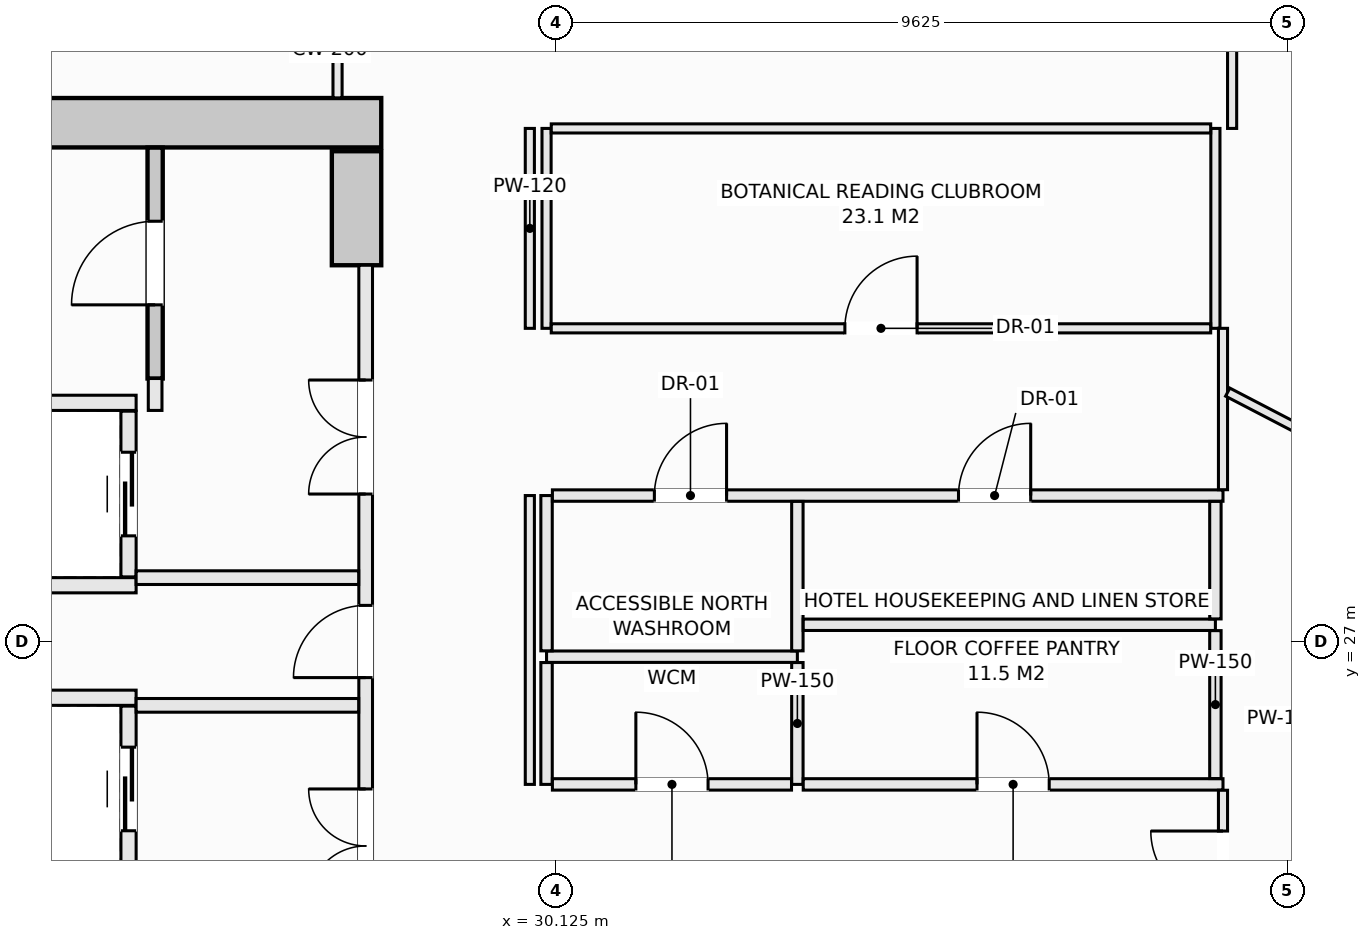
"""IFC4 building model, lengths in metres.
Left out: names, types, materials, properties, quantities, classifications, styles, units other than length and angle.
Written with IfcOpenShell. Run it as: python <this file> out.ifc"""

import sys

from ifc_helpers import new_model, si_unit, direction, frame, frame_2d, origin, place, context, subcontext, project, spatial, rectangle, extrude, element, fill, save


model = new_model("IFC4")
c1 = context("Model", 3, precision=1e-05, world=origin(), true_north=direction((0.0, 1.0)))
c2 = subcontext(c1, "Body", "Model", "MODEL_VIEW")
j1 = project(units=[si_unit("LENGTHUNIT", "METRE"), si_unit("PLANEANGLEUNIT", "RADIAN")], contexts=[c1])
p1 = place(None, origin())
s1 = spatial("IfcSite", under=j1, at=p1, CompositionType="ELEMENT")
p2 = place(p1, origin())
s2 = spatial("IfcBuilding", under=s1, at=p2, CompositionType="ELEMENT")
p3 = place(p2, frame((0.0, 0.0, 173.3)))
s3 = spatial("IfcBuildingStorey", under=s2, at=p3, CompositionType="ELEMENT", Elevation=173.3)
p4 = place(p3, frame((14.175, 33.825, -0.27), z_axis=(0.0, 0.0, 1.0), x_axis=(1.0, 0.0, 0.0)))
e1 = element("IfcWall", 1, at=p4, inside=s3, PredefinedType="SHEAR", context=c2, shape_type="SweptSolid", body=[
    extrude(rectangle(XDim=13.65, YDim=0.65, at=frame_2d((6.825, 0.0))), origin(), (0.0, 0.0, 1.0), 3.4),
])
p5 = place(p3, frame((27.5, 31.95, -0.27), z_axis=(0.0, 0.0, 1.0), x_axis=(0.0, 1.0, 0.0)))
e2 = element("IfcWall", 2, at=p5, inside=s3, PredefinedType="SHEAR", context=c2, shape_type="SweptSolid", body=[
    extrude(rectangle(XDim=1.5, YDim=0.65, at=frame_2d((0.75, 0.0))), origin(), (0.0, 0.0, 1.0), 3.4),
])
p6 = place(p3, frame((24.85, 30.46, -0.27), z_axis=(0.0, 0.0, 1.0), x_axis=(0.0, 1.0, 0.0)))
e3 = element("IfcWall", 3, at=p6, inside=s3, PredefinedType="SHEAR", context=c2, shape_type="SweptSolid", body=[
    extrude(rectangle(XDim=3.038, YDim=0.2, at=frame_2d((1.519, 0.0))), origin(), (0.0, 0.0, 1.0), 3.4),
])
p7 = place(p6, frame((0.969, 0.0, 0.27)))
e4 = element("IfcOpeningElement", 4, at=p7, cuts=e3, PredefinedType="OPENING", context=c2, shape_type="SweptSolid", body=[
    extrude(rectangle(XDim=1.1, YDim=2.15, at=frame_2d((0.55, 1.075))), frame((0.0, 0.11, 0.0), z_axis=(0.0, -1.0, 0.0), x_axis=(1.0, 0.0, 0.0)), (0.0, 0.0, 1.0), 0.22),
])
for number, where, z_axis, x_axis in (
    (5, (22.15, 30.14, 0.0), (0.0, 0.0, 1.0), (1.0, 0.0, 0.0)),
    (6, (22.15, 27.74, 0.0), (0.0, 0.0, 1.0), (1.0, 0.0, 0.0)),
):
    element("IfcWall", number, at=place(p3, frame(where, z_axis=z_axis, x_axis=x_axis)), inside=s3, PredefinedType="SOLIDWALL", context=c2, shape_type="SweptSolid", body=[
        extrude(rectangle(XDim=2.45, YDim=0.2, at=frame_2d((1.225, 0.0))), origin(), (0.0, 0.0, 1.0), 3.13),
    ])
p8 = place(p3, frame((24.5, 27.85, 0.0), z_axis=(0.0, 0.0, 1.0), x_axis=(0.0, 1.0, 0.0)))
e7 = element("IfcWall", 7, at=p8, inside=s3, PredefinedType="SOLIDWALL", context=c2, shape_type="SweptSolid", body=[
    extrude(rectangle(XDim=2.18, YDim=0.2, at=frame_2d((1.09, 0.0))), origin(), (0.0, 0.0, 1.0), 3.13),
])
p9 = place(p8, frame((0.54, 0.0, 0.0)))
e8 = element("IfcOpeningElement", 8, at=p9, cuts=e7, PredefinedType="OPENING", context=c2, shape_type="SweptSolid", body=[
    extrude(rectangle(XDim=1.1, YDim=2.2, at=frame_2d((0.55, 1.1))), frame((0.0, 0.11, 0.0), z_axis=(0.0, -1.0, 0.0), x_axis=(1.0, 0.0, 0.0)), (0.0, 0.0, 1.0), 0.22),
])
p10 = place(p3, frame((22.15, 26.26, 0.0), z_axis=(0.0, 0.0, 1.0), x_axis=(1.0, 0.0, 0.0)))
e9 = element("IfcWall", 9, at=p10, inside=s3, PredefinedType="SOLIDWALL", context=c2, shape_type="SweptSolid", body=[
    extrude(rectangle(XDim=2.45, YDim=0.2, at=frame_2d((1.225, 0.0))), origin(), (0.0, 0.0, 1.0), 3.13),
])
p11 = place(p3, frame((24.5, 23.97, 0.0), z_axis=(0.0, 0.0, 1.0), x_axis=(0.0, 1.0, 0.0)))
e10 = element("IfcWall", 10, at=p11, inside=s3, PredefinedType="SOLIDWALL", context=c2, shape_type="SweptSolid", body=[
    extrude(rectangle(XDim=2.18, YDim=0.2, at=frame_2d((1.09, 0.0))), origin(), (0.0, 0.0, 1.0), 3.13),
])
p12 = place(p11, frame((0.54, 0.0, 0.0)))
e11 = element("IfcOpeningElement", 11, at=p12, cuts=e10, PredefinedType="OPENING", context=c2, shape_type="SweptSolid", body=[
    extrude(rectangle(XDim=1.1, YDim=2.2, at=frame_2d((0.55, 1.1))), frame((0.0, 0.11, 0.0), z_axis=(0.0, -1.0, 0.0), x_axis=(1.0, 0.0, 0.0)), (0.0, 0.0, 1.0), 0.22),
])
p13 = place(p3, frame((24.85, 30.04, 0.0), z_axis=(0.0, 0.0, 1.0), x_axis=(0.0, 1.0, 0.0)))
e12 = element("IfcWall", 12, at=p13, inside=s3, PredefinedType="SOLIDWALL", context=c2, shape_type="SweptSolid", body=[
    extrude(rectangle(XDim=0.42, YDim=0.18, at=frame_2d((0.21, 0.0))), origin(), (0.0, 0.0, 1.0), 3.13),
])
p14 = place(p3, frame((27.62, 22.05, 0.0), z_axis=(0.0, 0.0, 1.0), x_axis=(0.0, 1.0, 0.0)))
e13 = element("IfcWall", 13, at=p14, inside=s3, PredefinedType="SOLIDWALL", context=c2, shape_type="SweptSolid", body=[
    extrude(rectangle(XDim=9.9, YDim=0.18, at=frame_2d((4.95, 0.0))), origin(), (0.0, 0.0, 1.0), 3.13),
])
p15 = place(p14, frame((4.475, 0.0, 0.0)))
e14 = element("IfcOpeningElement", 14, at=p15, cuts=e13, PredefinedType="OPENING", context=c2, shape_type="SweptSolid", body=[
    extrude(rectangle(XDim=0.95, YDim=2.1, at=frame_2d((0.475, 1.05))), frame((0.0, 0.1, 0.0), z_axis=(0.0, -1.0, 0.0), x_axis=(1.0, 0.0, 0.0)), (0.0, 0.0, 1.0), 0.2),
])
p16 = place(p14, frame((6.89, 0.0, 0.0)))
e15 = element("IfcOpeningElement", 15, at=p16, cuts=e13, PredefinedType="OPENING", context=c2, shape_type="SweptSolid", body=[
    extrude(rectangle(XDim=1.5, YDim=2.2, at=frame_2d((0.75, 1.1))), frame((0.0, 0.1, 0.0), z_axis=(0.0, -1.0, 0.0), x_axis=(1.0, 0.0, 0.0)), (0.0, 0.0, 1.0), 0.2),
])
p17 = place(p14, frame((1.51, 0.0, 0.0)))
e16 = element("IfcOpeningElement", 16, at=p17, cuts=e13, PredefinedType="OPENING", context=c2, shape_type="SweptSolid", body=[
    extrude(rectangle(XDim=1.5, YDim=2.2, at=frame_2d((0.75, 1.1))), frame((0.0, 0.1, 0.0), z_axis=(0.0, -1.0, 0.0), x_axis=(1.0, 0.0, 0.0)), (0.0, 0.0, 1.0), 0.2),
])
for number, where, z_axis, x_axis in (
    (17, (24.6, 27.84, 0.0), (0.0, 0.0, 1.0), (1.0, 0.0, 0.0)),
    (18, (24.6, 26.16, 0.0), (0.0, 0.0, 1.0), (1.0, 0.0, 0.0)),
):
    element("IfcWall", number, at=place(p3, frame(where, z_axis=z_axis, x_axis=x_axis)), inside=s3, PredefinedType="SOLIDWALL", context=c2, shape_type="SweptSolid", body=[
        extrude(rectangle(XDim=2.928, YDim=0.18, at=frame_2d((1.464, 0.0))), origin(), (0.0, 0.0, 1.0), 3.13),
    ])
p18 = place(p3, frame((30.0, 26.8, 0.0), z_axis=(0.0, 0.0, 1.0), x_axis=(1.0, 0.0, 0.0)))
e19 = element("IfcWall", 19, at=p18, inside=s3, PredefinedType="PARTITIONING", context=c2, shape_type="SweptSolid", body=[
    extrude(rectangle(XDim=3.3, YDim=0.15, at=frame_2d((1.65, 0.0))), origin(), (0.0, 0.0, 1.0), 3.13),
])
p19 = place(p3, frame((30.0, 25.12, 0.0), z_axis=(0.0, 0.0, 1.0), x_axis=(0.0, 1.0, 0.0)))
e20 = element("IfcWall", 20, at=p19, inside=s3, PredefinedType="PARTITIONING", context=c2, shape_type="SweptSolid", body=[
    extrude(rectangle(XDim=1.603, YDim=0.15, at=frame_2d((0.801, 0.0))), origin(), (0.0, 0.0, 1.0), 3.13),
])
p20 = place(p3, frame((30.0, 26.877, 0.0), z_axis=(0.0, 0.0, 1.0), x_axis=(0.0, 1.0, 0.0)))
e21 = element("IfcWall", 21, at=p20, inside=s3, PredefinedType="PARTITIONING", context=c2, shape_type="SweptSolid", body=[
    extrude(rectangle(XDim=2.043, YDim=0.15, at=frame_2d((1.021, 0.0))), origin(), (0.0, 0.0, 1.0), 3.13),
])
p21 = place(p3, frame((30.0, 31.12, 0.0), z_axis=(0.0, 0.0, 1.0), x_axis=(0.0, 1.0, 0.0)))
e22 = element("IfcWall", 22, at=p21, inside=s3, PredefinedType="PARTITIONING", context=c2, shape_type="SweptSolid", body=[
    extrude(rectangle(XDim=2.63, YDim=0.12, at=frame_2d((1.315, 0.0))), origin(), (0.0, 0.0, 1.0), 3.13),
])
p22 = place(p3, frame((30.077, 28.92, 0.0), z_axis=(0.0, 0.0, 1.0), x_axis=(1.0, 0.0, 0.0)))
e23 = element("IfcWall", 23, at=p22, inside=s3, PredefinedType="PARTITIONING", context=c2, shape_type="SweptSolid", body=[
    extrude(rectangle(XDim=8.823, YDim=0.15, at=frame_2d((4.412, 0.0))), origin(), (0.0, 0.0, 1.0), 3.13),
])
p23 = place(p22, frame((1.342, 0.0, 0.0)))
e24 = element("IfcOpeningElement", 24, at=p23, cuts=e23, PredefinedType="OPENING", context=c2, shape_type="SweptSolid", body=[
    extrude(rectangle(XDim=0.95, YDim=2.1, at=frame_2d((0.475, 1.05))), frame((0.0, 0.085, 0.0), z_axis=(0.0, -1.0, 0.0), x_axis=(1.0, 0.0, 0.0)), (0.0, 0.0, 1.0), 0.17),
])
p24 = place(p22, frame((5.343, 0.0, 0.0)))
e25 = element("IfcOpeningElement", 25, at=p24, cuts=e23, PredefinedType="OPENING", context=c2, shape_type="SweptSolid", body=[
    extrude(rectangle(XDim=0.95, YDim=2.1, at=frame_2d((0.475, 1.05))), frame((0.0, 0.085, 0.0), z_axis=(0.0, -1.0, 0.0), x_axis=(1.0, 0.0, 0.0)), (0.0, 0.0, 1.0), 0.17),
])
p25 = place(p3, frame((33.3, 25.12, 0.0), z_axis=(0.0, 0.0, 1.0), x_axis=(0.0, 1.0, 0.0)))
e26 = element("IfcWall", 26, at=p25, inside=s3, PredefinedType="PARTITIONING", context=c2, shape_type="SweptSolid", body=[
    extrude(rectangle(XDim=1.603, YDim=0.15, at=frame_2d((0.801, 0.0))), origin(), (0.0, 0.0, 1.0), 3.13),
])
p26 = place(p3, frame((33.3, 26.877, 0.0), z_axis=(0.0, 0.0, 1.0), x_axis=(0.0, 1.0, 0.0)))
e27 = element("IfcWall", 27, at=p26, inside=s3, PredefinedType="PARTITIONING", context=c2, shape_type="SweptSolid", body=[
    extrude(rectangle(XDim=1.966, YDim=0.15, at=frame_2d((0.983, 0.0))), origin(), (0.0, 0.0, 1.0), 3.13),
])
p27 = place(p3, frame((30.077, 25.12, 0.0), z_axis=(0.0, 0.0, 1.0), x_axis=(1.0, 0.0, 0.0)))
e28 = element("IfcWall", 28, at=p27, inside=s3, PredefinedType="PARTITIONING", context=c2, shape_type="SweptSolid", body=[
    extrude(rectangle(XDim=3.146, YDim=0.15, at=frame_2d((1.573, 0.0))), origin(), (0.0, 0.0, 1.0), 3.13),
])
p28 = place(p27, frame((1.098, 0.0, 0.0)))
e29 = element("IfcOpeningElement", 29, at=p28, cuts=e28, PredefinedType="OPENING", context=c2, shape_type="SweptSolid", body=[
    extrude(rectangle(XDim=0.95, YDim=2.1, at=frame_2d((0.475, 1.05))), frame((0.0, 0.085, 0.0), z_axis=(0.0, -1.0, 0.0), x_axis=(1.0, 0.0, 0.0)), (0.0, 0.0, 1.0), 0.17),
])
p29 = place(p3, frame((33.377, 25.12, 0.0), z_axis=(0.0, 0.0, 1.0), x_axis=(1.0, 0.0, 0.0)))
e30 = element("IfcWall", 30, at=p29, inside=s3, PredefinedType="PARTITIONING", context=c2, shape_type="SweptSolid", body=[
    extrude(rectangle(XDim=5.523, YDim=0.15, at=frame_2d((2.761, 0.0))), origin(), (0.0, 0.0, 1.0), 3.13),
])
p30 = place(p29, frame((2.287, 0.0, 0.0)))
e31 = element("IfcOpeningElement", 31, at=p30, cuts=e30, PredefinedType="OPENING", context=c2, shape_type="SweptSolid", body=[
    extrude(rectangle(XDim=0.95, YDim=2.1, at=frame_2d((0.475, 1.05))), frame((0.0, 0.085, 0.0), z_axis=(0.0, -1.0, 0.0), x_axis=(1.0, 0.0, 0.0)), (0.0, 0.0, 1.0), 0.17),
])
p31 = place(p3, frame((33.377, 27.22, 0.0), z_axis=(0.0, 0.0, 1.0), x_axis=(1.0, 0.0, 0.0)))
e32 = element("IfcWall", 32, at=p31, inside=s3, PredefinedType="PARTITIONING", context=c2, shape_type="SweptSolid", body=[
    extrude(rectangle(XDim=5.423, YDim=0.15, at=frame_2d((2.711, 0.0))), origin(), (0.0, 0.0, 1.0), 3.13),
])
p32 = place(p3, frame((38.8, 25.197, 0.0), z_axis=(0.0, 0.0, 1.0), x_axis=(0.0, 1.0, 0.0)))
e33 = element("IfcWall", 33, at=p32, inside=s3, PredefinedType="PARTITIONING", context=c2, shape_type="SweptSolid", body=[
    extrude(rectangle(XDim=1.946, YDim=0.15, at=frame_2d((0.973, 0.0))), origin(), (0.0, 0.0, 1.0), 3.13),
])
p33 = place(p3, frame((38.8, 27.297, 0.0), z_axis=(0.0, 0.0, 1.0), x_axis=(0.0, 1.0, 0.0)))
e34 = element("IfcWall", 34, at=p33, inside=s3, PredefinedType="PARTITIONING", context=c2, shape_type="SweptSolid", body=[
    extrude(rectangle(XDim=1.546, YDim=0.15, at=frame_2d((0.773, 0.0))), origin(), (0.0, 0.0, 1.0), 3.13),
])
p34 = place(p3, frame((38.8, 31.12, 0.0), z_axis=(0.0, 0.0, 1.0), x_axis=(0.0, 1.0, 0.0)))
e35 = element("IfcWall", 35, at=p34, inside=s3, PredefinedType="PARTITIONING", context=c2, shape_type="SweptSolid", body=[
    extrude(rectangle(XDim=2.63, YDim=0.12, at=frame_2d((1.315, 0.0))), origin(), (0.0, 0.0, 1.0), 3.13),
])
p35 = place(p3, frame((30.062, 31.12, 0.0), z_axis=(0.0, 0.0, 1.0), x_axis=(1.0, 0.0, 0.0)))
e36 = element("IfcWall", 36, at=p35, inside=s3, PredefinedType="PARTITIONING", context=c2, shape_type="SweptSolid", body=[
    extrude(rectangle(XDim=8.676, YDim=0.12, at=frame_2d((4.338, 0.0))), origin(), (0.0, 0.0, 1.0), 3.13),
])
p36 = place(p35, frame((3.863, 0.0, 0.0)))
e37 = element("IfcOpeningElement", 37, at=p36, cuts=e36, PredefinedType="OPENING", context=c2, shape_type="SweptSolid", body=[
    extrude(rectangle(XDim=0.95, YDim=2.1, at=frame_2d((0.475, 1.05))), frame((0.0, 0.07, 0.0), z_axis=(0.0, -1.0, 0.0), x_axis=(1.0, 0.0, 0.0)), (0.0, 0.0, 1.0), 0.14),
])
p37 = place(p3, frame((30.062, 33.75, 0.0), z_axis=(0.0, 0.0, 1.0), x_axis=(1.0, 0.0, 0.0)))
e38 = element("IfcWall", 38, at=p37, inside=s3, PredefinedType="PARTITIONING", context=c2, shape_type="SweptSolid", body=[
    extrude(rectangle(XDim=8.676, YDim=0.12, at=frame_2d((4.338, 0.0))), origin(), (0.0, 0.0, 1.0), 3.13),
])
p38 = place(p3, frame((39.02, 33.75, 0.0), z_axis=(0.0, 0.0, 1.0), x_axis=(0.0, 1.0, 0.0)))
e39 = element("IfcWall", 39, at=p38, inside=s3, PredefinedType="PARTITIONING", context=c2, shape_type="SweptSolid", body=[
    extrude(rectangle(XDim=2.0, YDim=0.12, at=frame_2d((1.0, 0.0))), origin(), (0.0, 0.0, 1.0), 3.13),
])
p39 = place(p3, frame((27.25, 34.152, 0.0), z_axis=(0.0, 0.0, 1.0), x_axis=(0.0, 1.0, 0.0)))
e40 = element("IfcWall", 40, at=p39, inside=s3, PredefinedType="PARTITIONING", context=c2, shape_type="SweptSolid", body=[
    extrude(rectangle(XDim=0.806, YDim=0.12, at=frame_2d((0.403, 0.0))), origin(), (0.0, 0.0, 1.0), 3.13),
])
p40 = place(p3, frame((29.78, 25.12, 0.0), z_axis=(0.0, 0.0, 1.0), x_axis=(0.0, 1.0, 0.0)))
e41 = element("IfcWall", 41, at=p40, inside=s3, PredefinedType="PARTITIONING", context=c2, shape_type="SweptSolid", body=[
    extrude(rectangle(XDim=3.8, YDim=0.12, at=frame_2d((1.9, 0.0))), origin(), (0.0, 0.0, 1.0), 3.13),
])
p41 = place(p3, frame((29.78, 31.12, 0.0), z_axis=(0.0, 0.0, 1.0), x_axis=(0.0, 1.0, 0.0)))
e42 = element("IfcWall", 42, at=p41, inside=s3, PredefinedType="PARTITIONING", context=c2, shape_type="SweptSolid", body=[
    extrude(rectangle(XDim=2.63, YDim=0.12, at=frame_2d((1.315, 0.0))), origin(), (0.0, 0.0, 1.0), 3.13),
])
p42 = place(p3, frame((38.9, 23.02, 0.0), z_axis=(0.0, 0.0, 1.0), x_axis=(0.0, 1.0, 0.0)))
e43 = element("IfcWall", 43, at=p42, inside=s3, PredefinedType="PARTITIONING", context=c2, shape_type="SweptSolid", body=[
    extrude(rectangle(XDim=2.023, YDim=0.12, at=frame_2d((1.011, 0.0))), origin(), (0.0, 0.0, 1.0), 3.13),
])
p43 = place(p42, frame((0.537, 0.0, 0.0)))
e44 = element("IfcOpeningElement", 44, at=p43, cuts=e43, PredefinedType="OPENING", context=c2, shape_type="SweptSolid", body=[
    extrude(rectangle(XDim=0.95, YDim=2.1, at=frame_2d((0.475, 1.05))), frame((0.0, 0.07, 0.0), z_axis=(0.0, -1.0, 0.0), x_axis=(1.0, 0.0, 0.0)), (0.0, 0.0, 1.0), 0.14),
])
p44 = place(p3, frame((38.9, 28.997, 0.0), z_axis=(0.0, 0.0, 1.0), x_axis=(0.0, 1.0, 0.0)))
e45 = element("IfcWall", 45, at=p44, inside=s3, PredefinedType="PARTITIONING", context=c2, shape_type="SweptSolid", body=[
    extrude(rectangle(XDim=2.123, YDim=0.12, at=frame_2d((1.062, 0.0))), origin(), (0.0, 0.0, 1.0), 3.13),
])
p45 = place(p3, frame((38.962, 30.281, 0.0), z_axis=(0.0, 0.0, 1.0), x_axis=(0.887114590422, -0.461549242725, 0.0)))
e46 = element("IfcWall", 46, at=p45, inside=s3, PredefinedType="PARTITIONING", context=c2, shape_type="SweptSolid", body=[
    extrude(rectangle(XDim=14.004, YDim=0.12, at=frame_2d((7.002, 0.0))), origin(), (0.0, 0.0, 1.0), 2.505),
])
p46 = place(p3, frame((39.023, 20.874, 0.0), z_axis=(0.0, 0.0, 1.0), x_axis=(0.636698291185, 0.771113017658, 0.0)))
e47 = element("IfcWall", 47, at=p46, inside=s3, PredefinedType="PARTITIONING", context=c2, shape_type="SweptSolid", body=[
    extrude(rectangle(XDim=8.44, YDim=0.15, at=frame_2d((4.22, 0.0))), origin(), (0.0, 0.0, 1.0), 2.505),
])
p47 = place(p7, origin())
e48 = element("IfcDoor", 48, at=p47, inside=s3, OperationType="SINGLE_SWING_LEFT", PredefinedType="DOOR", context=c2, shape_type="SweptSolid", body=[
    extrude(rectangle(XDim=1.1, YDim=2.15, at=frame_2d((0.55, 1.075))), frame((0.0, 0.025, 0.0), z_axis=(0.0, -1.0, 0.0), x_axis=(1.0, 0.0, 0.0)), (0.0, 0.0, 1.0), 0.05),
])
fill(e4, e48)
p48 = place(p9, origin())
e49 = element("IfcDoor", 49, at=p48, inside=s3, OperationType="SLIDING_TO_LEFT", PredefinedType="DOOR", context=c2, shape_type="SweptSolid", body=[
    extrude(rectangle(XDim=1.1, YDim=2.2, at=frame_2d((0.55, 1.1))), frame((0.0, 0.025, 0.0), z_axis=(0.0, -1.0, 0.0), x_axis=(1.0, 0.0, 0.0)), (0.0, 0.0, 1.0), 0.05),
])
fill(e8, e49)
p49 = place(p12, origin())
e50 = element("IfcDoor", 50, at=p49, inside=s3, OperationType="SLIDING_TO_LEFT", PredefinedType="DOOR", context=c2, shape_type="SweptSolid", body=[
    extrude(rectangle(XDim=1.1, YDim=2.2, at=frame_2d((0.55, 1.1))), frame((0.0, 0.025, 0.0), z_axis=(0.0, -1.0, 0.0), x_axis=(1.0, 0.0, 0.0)), (0.0, 0.0, 1.0), 0.05),
])
fill(e11, e50)
p50 = place(p15, origin())
e51 = element("IfcDoor", 51, at=p50, inside=s3, OperationType="SINGLE_SWING_LEFT", PredefinedType="DOOR", context=c2, shape_type="SweptSolid", body=[
    extrude(rectangle(XDim=0.95, YDim=2.1, at=frame_2d((0.475, 1.05))), frame((0.0, 0.025, 0.0), z_axis=(0.0, -1.0, 0.0), x_axis=(1.0, 0.0, 0.0)), (0.0, 0.0, 1.0), 0.05),
])
fill(e14, e51)
p51 = place(p16, origin())
e52 = element("IfcDoor", 52, at=p51, inside=s3, OperationType="DOUBLE_DOOR_SINGLE_SWING", PredefinedType="DOOR", context=c2, shape_type="SweptSolid", body=[
    extrude(rectangle(XDim=1.5, YDim=2.2, at=frame_2d((0.75, 1.1))), frame((0.0, 0.025, 0.0), z_axis=(0.0, -1.0, 0.0), x_axis=(1.0, 0.0, 0.0)), (0.0, 0.0, 1.0), 0.05),
])
fill(e15, e52)
p52 = place(p17, origin())
e53 = element("IfcDoor", 53, at=p52, inside=s3, OperationType="DOUBLE_DOOR_SINGLE_SWING", PredefinedType="DOOR", context=c2, shape_type="SweptSolid", body=[
    extrude(rectangle(XDim=1.5, YDim=2.2, at=frame_2d((0.75, 1.1))), frame((0.0, 0.025, 0.0), z_axis=(0.0, -1.0, 0.0), x_axis=(1.0, 0.0, 0.0)), (0.0, 0.0, 1.0), 0.05),
])
fill(e16, e53)
p53 = place(p23, origin())
e54 = element("IfcDoor", 54, at=p53, inside=s3, OperationType="SINGLE_SWING_RIGHT", PredefinedType="DOOR", context=c2, shape_type="SweptSolid", body=[
    extrude(rectangle(XDim=0.95, YDim=2.1, at=frame_2d((0.475, 1.05))), frame((0.0, 0.025, 0.0), z_axis=(0.0, -1.0, 0.0), x_axis=(1.0, 0.0, 0.0)), (0.0, 0.0, 1.0), 0.05),
])
fill(e24, e54)
p54 = place(p28, origin())
e55 = element("IfcDoor", 55, at=p54, inside=s3, OperationType="SINGLE_SWING_LEFT", PredefinedType="DOOR", context=c2, shape_type="SweptSolid", body=[
    extrude(rectangle(XDim=0.95, YDim=2.1, at=frame_2d((0.475, 1.05))), frame((0.0, 0.025, 0.0), z_axis=(0.0, -1.0, 0.0), x_axis=(1.0, 0.0, 0.0)), (0.0, 0.0, 1.0), 0.05),
])
fill(e29, e55)
p55 = place(p24, origin())
e56 = element("IfcDoor", 56, at=p55, inside=s3, OperationType="SINGLE_SWING_RIGHT", PredefinedType="DOOR", context=c2, shape_type="SweptSolid", body=[
    extrude(rectangle(XDim=0.95, YDim=2.1, at=frame_2d((0.475, 1.05))), frame((0.0, 0.025, 0.0), z_axis=(0.0, -1.0, 0.0), x_axis=(1.0, 0.0, 0.0)), (0.0, 0.0, 1.0), 0.05),
])
fill(e25, e56)
p56 = place(p30, origin())
e57 = element("IfcDoor", 57, at=p56, inside=s3, OperationType="SINGLE_SWING_LEFT", PredefinedType="DOOR", context=c2, shape_type="SweptSolid", body=[
    extrude(rectangle(XDim=0.95, YDim=2.1, at=frame_2d((0.475, 1.05))), frame((0.0, 0.025, 0.0), z_axis=(0.0, -1.0, 0.0), x_axis=(1.0, 0.0, 0.0)), (0.0, 0.0, 1.0), 0.05),
])
fill(e31, e57)
p57 = place(p36, origin())
e58 = element("IfcDoor", 58, at=p57, inside=s3, OperationType="SINGLE_SWING_RIGHT", PredefinedType="DOOR", context=c2, shape_type="SweptSolid", body=[
    extrude(rectangle(XDim=0.95, YDim=2.1, at=frame_2d((0.475, 1.05))), frame((0.0, 0.025, 0.0), z_axis=(0.0, -1.0, 0.0), x_axis=(1.0, 0.0, 0.0)), (0.0, 0.0, 1.0), 0.05),
])
fill(e37, e58)
p58 = place(p43, origin())
e59 = element("IfcDoor", 59, at=p58, inside=s3, OperationType="SINGLE_SWING_RIGHT", PredefinedType="DOOR", context=c2, shape_type="SweptSolid", body=[
    extrude(rectangle(XDim=0.95, YDim=2.1, at=frame_2d((0.475, 1.05))), frame((0.0, 0.025, 0.0), z_axis=(0.0, -1.0, 0.0), x_axis=(1.0, 0.0, 0.0)), (0.0, 0.0, 1.0), 0.05),
])
fill(e44, e59)
save(model, sys.argv[1])
